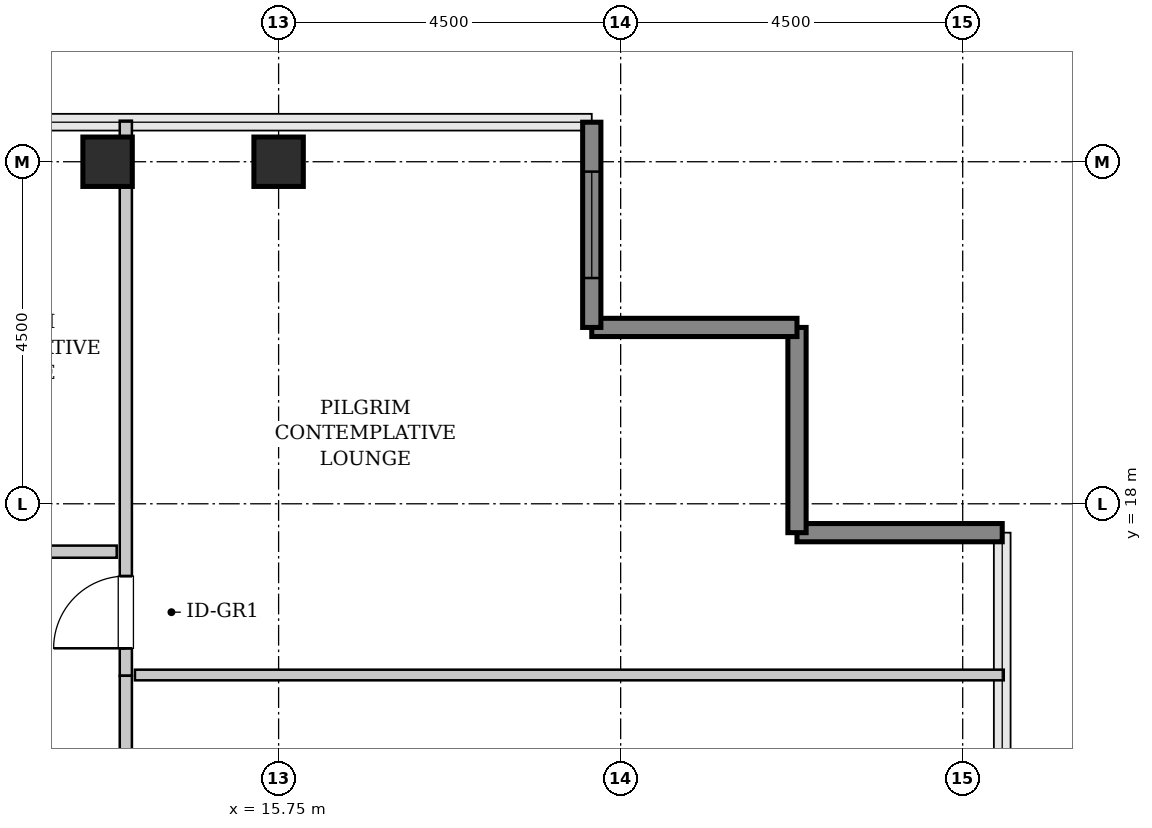
"""IFC4 building model, lengths in metres.
Left out: names, types, materials, properties, quantities, classifications, styles, units other than length and angle.
Written with IfcOpenShell. Run it as: python <this file> out.ifc"""

import sys

from ifc_helpers import new_model, si_unit, direction, frame, frame_2d, origin, origin_2d, place, context, subcontext, project, spatial, rectangle, hollow_rectangle, extrude, source, transform, mapped, element, fill, save


model = new_model("IFC4")
c1 = context("Model", 3, precision=1e-05, world=origin(), true_north=direction((0.0, 1.0)))
c2 = subcontext(c1, "Body", "Model", "MODEL_VIEW")
j1 = project(units=[si_unit("LENGTHUNIT", "METRE"), si_unit("PLANEANGLEUNIT", "RADIAN")], contexts=[c1])
p1 = place(None, origin())
s1 = spatial("IfcSite", under=j1, at=p1, CompositionType="ELEMENT")
p2 = place(p1, origin())
s2 = spatial("IfcBuilding", under=s1, at=p2, CompositionType="ELEMENT")
p3 = place(p2, frame((0.0, 0.0, 256.0)))
s3 = spatial("IfcBuildingStorey", under=s2, at=p3, CompositionType="ELEMENT", Elevation=256.0)
m1 = source(origin(), c2, "Body", "SweptSolid", [
    extrude(hollow_rectangle(XDim=0.65, YDim=0.65, WallThickness=0.032, InnerFilletRadius=0.032, OuterFilletRadius=0.064, at=origin_2d()), origin(), (0.0, 0.0, 1.0), 3.8),
])
for number, where, z_axis, x_axis in (
    (1, (13.5, 22.5, 0.0), (0.0, 0.0, 1.0), (1.0, 0.0, 0.0)),
    (2, (15.75, 22.5, 0.0), (0.0, 0.0, 1.0), (1.0, 0.0, 0.0)),
):
    element("IfcColumn", number, at=place(p3, frame(where, z_axis=z_axis, x_axis=x_axis)), inside=s3, PredefinedType="COLUMN", context=c2, shape_type="MappedRepresentation", body=[
        mapped(m1, transform((0.0, 0.0, 0.0), x_axis=(1.0, 0.0, 0.0), y_axis=(0.0, 1.0, 0.0), z_axis=(0.0, 0.0, 1.0), scale=1.0)),
    ])
m2 = source(origin(), c2, "Body", "SweptSolid", [
    extrude(rectangle(XDim=2.7, YDim=0.24, at=frame_2d((1.35, 0.0))), origin(), (0.0, 0.0, 1.0), 3.5),
])
for number, where, z_axis, x_axis in (
    (3, (25.27, 17.62, 0.0), (0.0, 0.0, 1.0), (-1.0, 0.0, 0.0)),
    (4, (22.57, 17.62, 0.0), (0.0, 0.0, 1.0), (0.0, 1.0, 0.0)),
    (5, (22.57, 20.32, 0.0), (0.0, 0.0, 1.0), (-1.0, 0.0, 0.0)),
):
    element("IfcWall", number, at=place(p3, frame(where, z_axis=z_axis, x_axis=x_axis)), inside=s3, PredefinedType="SHEAR", context=c2, shape_type="MappedRepresentation", body=[
        mapped(m2, transform((0.0, 0.0, 0.0), x_axis=(1.0, 0.0, 0.0), y_axis=(0.0, 1.0, 0.0), z_axis=(0.0, 0.0, 1.0), scale=1.0)),
    ])
p4 = place(p3, frame((19.87, 20.32, 0.0), z_axis=(0.0, 0.0, 1.0), x_axis=(0.0, 1.0, 0.0)))
e6 = element("IfcWall", 6, at=p4, inside=s3, PredefinedType="SHEAR", context=c2, shape_type="MappedRepresentation", body=[
    mapped(m2, transform((0.0, 0.0, 0.0), x_axis=(1.0, 0.0, 0.0), y_axis=(0.0, 1.0, 0.0), z_axis=(0.0, 0.0, 1.0), scale=1.0)),
])
p5 = place(p4, frame((0.65, 0.0, 0.85)))
e7 = element("IfcOpeningElement", 7, at=p5, cuts=e6, PredefinedType="OPENING", context=c2, shape_type="SweptSolid", body=[
    extrude(rectangle(XDim=1.4, YDim=1.8, at=frame_2d((0.7, 0.9))), frame((0.0, 0.13, 0.0), z_axis=(0.0, -1.0, 0.0), x_axis=(1.0, 0.0, 0.0)), (0.0, 0.0, 1.0), 0.26),
])
m3 = source(origin(), c2, "Body", "SweptSolid", [
    extrude(rectangle(XDim=7.302, YDim=0.16, at=frame_2d((3.651, 0.0))), origin(), (0.0, 0.0, 1.0), 3.485),
])
p6 = place(p3, frame((13.74, 15.738, 0.0), z_axis=(0.0, 0.0, 1.0), x_axis=(0.0, 1.0, 0.0)))
e8 = element("IfcWall", 8, at=p6, inside=s3, PredefinedType="PARTITIONING", context=c2, shape_type="MappedRepresentation", body=[
    mapped(m3, transform((0.0, 0.0, 0.0), x_axis=(1.0, 0.0, 0.0), y_axis=(0.0, 1.0, 0.0), z_axis=(0.0, 0.0, 1.0), scale=1.0)),
])
p7 = place(p6, frame((0.361, 0.0, 0.0)))
e9 = element("IfcOpeningElement", 9, at=p7, cuts=e8, PredefinedType="OPENING", context=c2, shape_type="SweptSolid", body=[
    extrude(rectangle(XDim=0.95, YDim=2.1, at=frame_2d((0.475, 1.05))), frame((0.0, 0.09, 0.0), z_axis=(0.0, -1.0, 0.0), x_axis=(1.0, 0.0, 0.0)), (0.0, 0.0, 1.0), 0.18),
])
m4 = source(origin(), c2, "Body", "SweptSolid", [
    extrude(rectangle(XDim=11.43, YDim=0.14, at=frame_2d((5.715, 0.0))), origin(), (0.0, 0.0, 1.0), 3.485),
])
p8 = place(p3, frame((13.86, 15.748, 0.0), z_axis=(0.0, 0.0, 1.0), x_axis=(1.0, 0.0, 0.0)))
e10 = element("IfcWall", 10, at=p8, inside=s3, PredefinedType="PARTITIONING", context=c2, shape_type="MappedRepresentation", body=[
    mapped(m4, transform((0.0, 0.0, 0.0), x_axis=(1.0, 0.0, 0.0), y_axis=(0.0, 1.0, 0.0), z_axis=(0.0, 0.0, 1.0), scale=1.0)),
])
m5 = source(origin(), c2, "Body", "SweptSolid", [
    extrude(rectangle(XDim=7.242, YDim=0.16, at=frame_2d((3.621, 0.0))), origin(), (0.0, 0.0, 1.0), 3.485),
])
p9 = place(p3, frame((13.74, 8.495, 0.0), z_axis=(0.0, 0.0, 1.0), x_axis=(0.0, 1.0, 0.0)))
e11 = element("IfcWall", 11, at=p9, inside=s3, PredefinedType="PARTITIONING", context=c2, shape_type="MappedRepresentation", body=[
    mapped(m5, transform((0.0, 0.0, 0.0), x_axis=(1.0, 0.0, 0.0), y_axis=(0.0, 1.0, 0.0), z_axis=(0.0, 0.0, 1.0), scale=1.0)),
])
p10 = place(p9, frame((3.146, 0.0, 0.0)))
e12 = element("IfcOpeningElement", 12, at=p10, cuts=e11, PredefinedType="OPENING", context=c2, shape_type="SweptSolid", body=[
    extrude(rectangle(XDim=0.95, YDim=2.1, at=frame_2d((0.475, 1.05))), frame((0.0, 0.09, 0.0), z_axis=(0.0, -1.0, 0.0), x_axis=(1.0, 0.0, 0.0)), (0.0, 0.0, 1.0), 0.18),
])
m6 = source(origin(), c2, "Body", "SweptSolid", [
    extrude(rectangle(XDim=5.425, YDim=0.16, at=frame_2d((2.712, 0.0))), origin(), (0.0, 0.0, 1.0), 3.485),
])
p11 = place(p3, frame((8.195, 17.37, 0.0), z_axis=(0.0, 0.0, 1.0), x_axis=(1.0, 0.0, 0.0)))
e13 = element("IfcWall", 13, at=p11, inside=s3, PredefinedType="PARTITIONING", context=c2, shape_type="MappedRepresentation", body=[
    mapped(m6, transform((0.0, 0.0, 0.0), x_axis=(1.0, 0.0, 0.0), y_axis=(0.0, 1.0, 0.0), z_axis=(0.0, 0.0, 1.0), scale=1.0)),
])
p12 = place(p11, frame((1.611, 0.0, 0.0)))
e14 = element("IfcOpeningElement", 14, at=p12, cuts=e13, PredefinedType="OPENING", context=c2, shape_type="SweptSolid", body=[
    extrude(rectangle(XDim=0.95, YDim=2.1, at=frame_2d((0.475, 1.05))), frame((0.0, 0.09, 0.0), z_axis=(0.0, -1.0, 0.0), x_axis=(1.0, 0.0, 0.0)), (0.0, 0.0, 1.0), 0.18),
])
m7 = source(origin(), c2, "Body", "SweptSolid", [
    extrude(rectangle(XDim=1.4, YDim=1.8, at=frame_2d((0.7, 0.9))), frame((0.0, 0.03, 0.0), z_axis=(0.0, -1.0, 0.0), x_axis=(1.0, 0.0, 0.0)), (0.0, 0.0, 1.0), 0.06),
])
p13 = place(p5, origin())
e15 = element("IfcWindow", 15, at=p13, inside=s3, PartitioningType="SINGLE_PANEL", PredefinedType="WINDOW", context=c2, shape_type="MappedRepresentation", body=[
    mapped(m7, transform((0.0, 0.0, 0.0), x_axis=(1.0, 0.0, 0.0), y_axis=(0.0, 1.0, 0.0), z_axis=(0.0, 0.0, 1.0), scale=1.0)),
])
fill(e7, e15)
m8 = source(origin(), c2, "Body", "SweptSolid", [
    extrude(rectangle(XDim=0.95, YDim=2.1, at=frame_2d((0.475, 1.05))), frame((0.0, 0.025, 0.0), z_axis=(0.0, -1.0, 0.0), x_axis=(1.0, 0.0, 0.0)), (0.0, 0.0, 1.0), 0.05),
])
p14 = place(p7, origin())
e16 = element("IfcDoor", 16, at=p14, inside=s3, OperationType="SINGLE_SWING_LEFT", PredefinedType="DOOR", context=c2, shape_type="MappedRepresentation", body=[
    mapped(m8, transform((0.0, 0.0, 0.0), x_axis=(1.0, 0.0, 0.0), y_axis=(0.0, 1.0, 0.0), z_axis=(0.0, 0.0, 1.0), scale=1.0)),
])
fill(e9, e16)
save(model, sys.argv[1])
